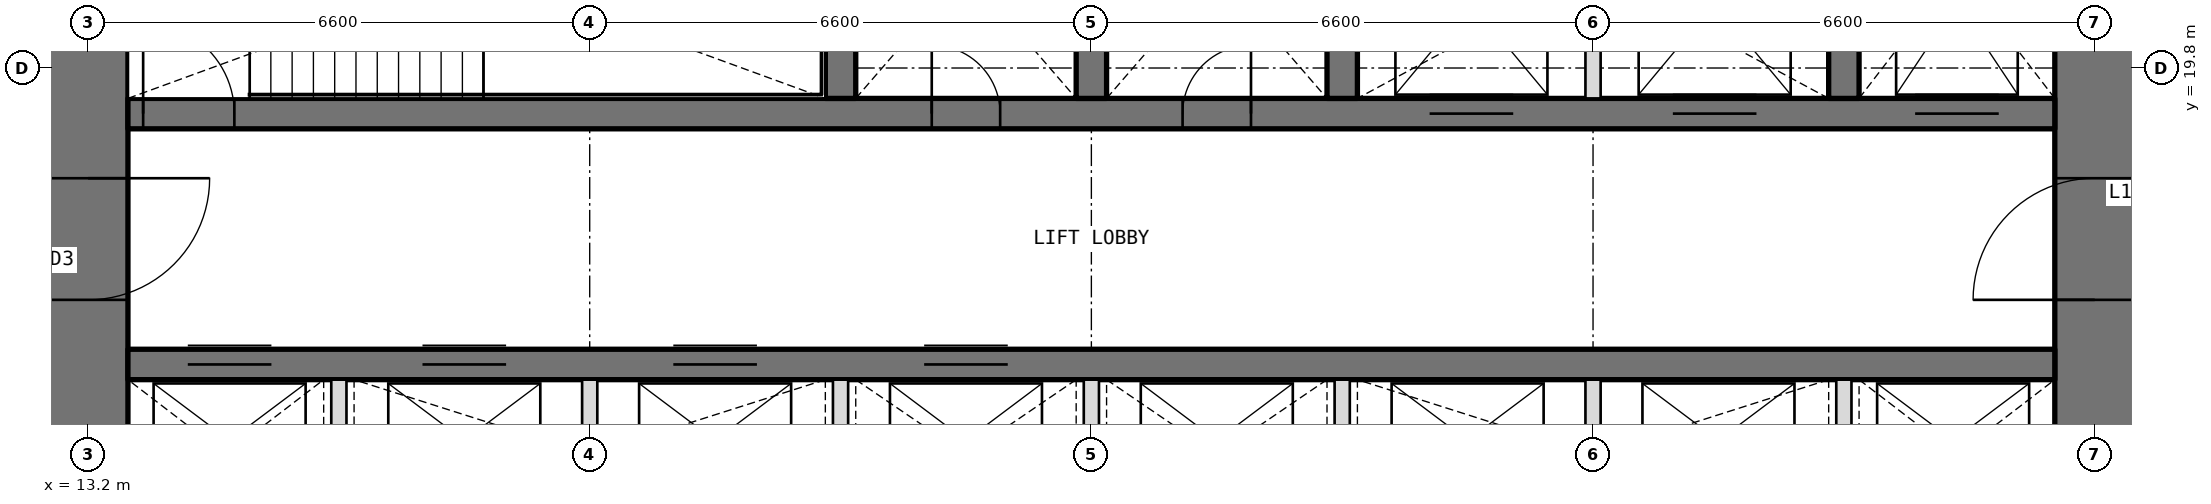
"""IFC4 building model, lengths in metres.
Left out: names, types, materials, properties, quantities, classifications, styles, units other than length and angle.
Written with IfcOpenShell. Run it as: python <this file> out.ifc"""

import sys

from ifc_helpers import new_model, si_unit, direction, frame, frame_2d, origin, place, context, subcontext, project, spatial, rectangle, extrude, element, fill, save


model = new_model("IFC4")
c1 = context("Model", 3, precision=1e-05, world=origin(), true_north=direction((0.0, 1.0)))
c2 = subcontext(c1, "Body", "Model", "MODEL_VIEW")
j1 = project(units=[si_unit("LENGTHUNIT", "METRE"), si_unit("PLANEANGLEUNIT", "RADIAN")], contexts=[c1])
p1 = place(None, origin())
s1 = spatial("IfcSite", under=j1, at=p1, CompositionType="ELEMENT")
p2 = place(p1, origin())
s2 = spatial("IfcBuilding", under=s1, at=p2, CompositionType="ELEMENT")
p3 = place(p2, frame((0.0, 0.0, 50.7)))
s3 = spatial("IfcBuildingStorey", under=s2, at=p3, CompositionType="ELEMENT", Elevation=50.7)
p4 = place(p3, frame((39.6, 13.725, 0.0), z_axis=(0.0, 0.0, 1.0), x_axis=(0.0, 1.0, 0.0)))
e1 = element("IfcWall", 1, at=p4, inside=s3, PredefinedType="SHEAR", context=c2, shape_type="SweptSolid", body=[
    extrude(rectangle(XDim=18.75, YDim=1.05, at=frame_2d((9.375, 0.0))), origin(), (0.0, 0.0, 1.0), 4.2),
])
p5 = place(p4, frame((3.025, 0.0, 0.0)))
e2 = element("IfcOpeningElement", 2, at=p5, cuts=e1, PredefinedType="OPENING", context=c2, shape_type="SweptSolid", body=[
    extrude(rectangle(XDim=1.6, YDim=2.1, at=frame_2d((0.8, 1.05))), frame((0.0, 0.535, 0.0), z_axis=(0.0, -1.0, 0.0), x_axis=(1.0, 0.0, 0.0)), (0.0, 0.0, 1.0), 1.07),
])
p6 = place(p4, frame((13.825, 0.0, 0.0)))
e3 = element("IfcOpeningElement", 3, at=p6, cuts=e1, PredefinedType="OPENING", context=c2, shape_type="SweptSolid", body=[
    extrude(rectangle(XDim=1.6, YDim=2.1, at=frame_2d((0.8, 1.05))), frame((0.0, 0.535, 0.0), z_axis=(0.0, -1.0, 0.0), x_axis=(1.0, 0.0, 0.0)), (0.0, 0.0, 1.0), 1.07),
])
p7 = place(p3, frame((13.2, 32.475, 0.0), z_axis=(0.0, 0.0, 1.0), x_axis=(0.0, -1.0, 0.0)))
e4 = element("IfcWall", 4, at=p7, inside=s3, PredefinedType="SHEAR", context=c2, shape_type="SweptSolid", body=[
    extrude(rectangle(XDim=18.75, YDim=1.05, at=frame_2d((9.375, 0.0))), origin(), (0.0, 0.0, 1.0), 4.2),
])
p8 = place(p7, frame((14.125, 0.0, 0.0)))
e5 = element("IfcOpeningElement", 5, at=p8, cuts=e4, PredefinedType="OPENING", context=c2, shape_type="SweptSolid", body=[
    extrude(rectangle(XDim=1.6, YDim=2.1, at=frame_2d((0.8, 1.05))), frame((0.0, 0.535, 0.0), z_axis=(0.0, -1.0, 0.0), x_axis=(1.0, 0.0, 0.0)), (0.0, 0.0, 1.0), 1.07),
])
p9 = place(p7, frame((3.325, 0.0, 0.0)))
e6 = element("IfcOpeningElement", 6, at=p9, cuts=e4, PredefinedType="OPENING", context=c2, shape_type="SweptSolid", body=[
    extrude(rectangle(XDim=1.6, YDim=2.1, at=frame_2d((0.8, 1.05))), frame((0.0, 0.535, 0.0), z_axis=(0.0, -1.0, 0.0), x_axis=(1.0, 0.0, 0.0)), (0.0, 0.0, 1.0), 1.07),
])
p10 = place(p3, frame((13.725, 15.9, 0.0), z_axis=(0.0, 0.0, 1.0), x_axis=(1.0, 0.0, 0.0)))
e7 = element("IfcWall", 7, at=p10, inside=s3, PredefinedType="SHEAR", context=c2, shape_type="SweptSolid", body=[
    extrude(rectangle(XDim=25.35, YDim=0.4, at=frame_2d((12.675, 0.0))), origin(), (0.0, 0.0, 1.0), 4.2),
])
p11 = place(p10, frame((0.788, 0.0, 0.0)))
e8 = element("IfcOpeningElement", 8, at=p11, cuts=e7, PredefinedType="OPENING", context=c2, shape_type="SweptSolid", body=[
    extrude(rectangle(XDim=1.1, YDim=2.1, at=frame_2d((0.55, 1.05))), frame((0.0, 0.21, 0.0), z_axis=(0.0, -1.0, 0.0), x_axis=(1.0, 0.0, 0.0)), (0.0, 0.0, 1.0), 0.42),
])
p12 = place(p10, frame((3.875, 0.0, 0.0)))
e9 = element("IfcOpeningElement", 9, at=p12, cuts=e7, PredefinedType="OPENING", context=c2, shape_type="SweptSolid", body=[
    extrude(rectangle(XDim=1.1, YDim=2.1, at=frame_2d((0.55, 1.05))), frame((0.0, 0.21, 0.0), z_axis=(0.0, -1.0, 0.0), x_axis=(1.0, 0.0, 0.0)), (0.0, 0.0, 1.0), 0.42),
])
p13 = place(p10, frame((7.175, 0.0, 0.0)))
e10 = element("IfcOpeningElement", 10, at=p13, cuts=e7, PredefinedType="OPENING", context=c2, shape_type="SweptSolid", body=[
    extrude(rectangle(XDim=1.1, YDim=2.1, at=frame_2d((0.55, 1.05))), frame((0.0, 0.21, 0.0), z_axis=(0.0, -1.0, 0.0), x_axis=(1.0, 0.0, 0.0)), (0.0, 0.0, 1.0), 0.42),
])
p14 = place(p10, frame((10.475, 0.0, 0.0)))
e11 = element("IfcOpeningElement", 11, at=p14, cuts=e7, PredefinedType="OPENING", context=c2, shape_type="SweptSolid", body=[
    extrude(rectangle(XDim=1.1, YDim=2.1, at=frame_2d((0.55, 1.05))), frame((0.0, 0.21, 0.0), z_axis=(0.0, -1.0, 0.0), x_axis=(1.0, 0.0, 0.0)), (0.0, 0.0, 1.0), 0.42),
])
p15 = place(p3, frame((13.725, 19.2, 0.0), z_axis=(0.0, 0.0, 1.0), x_axis=(1.0, 0.0, 0.0)))
e12 = element("IfcWall", 12, at=p15, inside=s3, PredefinedType="SHEAR", context=c2, shape_type="SweptSolid", body=[
    extrude(rectangle(XDim=25.35, YDim=0.4, at=frame_2d((12.675, 0.0))), origin(), (0.0, 0.0, 1.0), 4.2),
])
p16 = place(p15, frame((10.575, 0.0, 0.0)))
e13 = element("IfcOpeningElement", 13, at=p16, cuts=e12, PredefinedType="OPENING", context=c2, shape_type="SweptSolid", body=[
    extrude(rectangle(XDim=0.9, YDim=2.1, at=frame_2d((0.45, 1.05))), frame((0.0, 0.21, 0.0), z_axis=(0.0, -1.0, 0.0), x_axis=(1.0, 0.0, 0.0)), (0.0, 0.0, 1.0), 0.42),
])
p17 = place(p15, frame((13.875, 0.0, 0.0)))
e14 = element("IfcOpeningElement", 14, at=p17, cuts=e12, PredefinedType="OPENING", context=c2, shape_type="SweptSolid", body=[
    extrude(rectangle(XDim=0.9, YDim=2.1, at=frame_2d((0.45, 1.05))), frame((0.0, 0.21, 0.0), z_axis=(0.0, -1.0, 0.0), x_axis=(1.0, 0.0, 0.0)), (0.0, 0.0, 1.0), 0.42),
])
p18 = place(p15, frame((0.2, 0.0, 0.0)))
e15 = element("IfcOpeningElement", 15, at=p18, cuts=e12, PredefinedType="OPENING", context=c2, shape_type="SweptSolid", body=[
    extrude(rectangle(XDim=1.2, YDim=2.1, at=frame_2d((0.6, 1.05))), frame((0.0, 0.21, 0.0), z_axis=(0.0, -1.0, 0.0), x_axis=(1.0, 0.0, 0.0)), (0.0, 0.0, 1.0), 0.42),
])
p19 = place(p15, frame((23.512, 0.0, 0.0)))
e16 = element("IfcOpeningElement", 16, at=p19, cuts=e12, PredefinedType="OPENING", context=c2, shape_type="SweptSolid", body=[
    extrude(rectangle(XDim=1.1, YDim=2.1, at=frame_2d((0.55, 1.05))), frame((0.0, 0.21, 0.0), z_axis=(0.0, -1.0, 0.0), x_axis=(1.0, 0.0, 0.0)), (0.0, 0.0, 1.0), 0.42),
])
p20 = place(p15, frame((17.125, 0.0, 0.0)))
e17 = element("IfcOpeningElement", 17, at=p20, cuts=e12, PredefinedType="OPENING", context=c2, shape_type="SweptSolid", body=[
    extrude(rectangle(XDim=1.1, YDim=2.1, at=frame_2d((0.55, 1.05))), frame((0.0, 0.21, 0.0), z_axis=(0.0, -1.0, 0.0), x_axis=(1.0, 0.0, 0.0)), (0.0, 0.0, 1.0), 0.42),
])
p21 = place(p15, frame((20.325, 0.0, 0.0)))
e18 = element("IfcOpeningElement", 18, at=p21, cuts=e12, PredefinedType="OPENING", context=c2, shape_type="SweptSolid", body=[
    extrude(rectangle(XDim=1.1, YDim=2.1, at=frame_2d((0.55, 1.05))), frame((0.0, 0.21, 0.0), z_axis=(0.0, -1.0, 0.0), x_axis=(1.0, 0.0, 0.0)), (0.0, 0.0, 1.0), 0.42),
])
for number, where, z_axis, x_axis in (
    (19, (23.1, 19.4, 0.0), (0.0, 0.0, 1.0), (0.0, 1.0, 0.0)),
    (20, (26.4, 19.4, 0.0), (0.0, 0.0, 1.0), (0.0, 1.0, 0.0)),
    (21, (29.7, 19.4, 0.0), (0.0, 0.0, 1.0), (0.0, 1.0, 0.0)),
    (22, (36.3, 19.4, 0.0), (0.0, 0.0, 1.0), (0.0, 1.0, 0.0)),
):
    element("IfcWall", number, at=place(p3, frame(where, z_axis=z_axis, x_axis=x_axis)), inside=s3, PredefinedType="SHEAR", context=c2, shape_type="SweptSolid", body=[
        extrude(rectangle(XDim=3.35, YDim=0.4, at=frame_2d((1.675, 0.0))), origin(), (0.0, 0.0, 1.0), 4.2),
    ])
for number, where, z_axis, x_axis in (
    (23, (16.5, 13.725, 0.0), (0.0, 0.0, 1.0), (0.0, 1.0, 0.0)),
    (24, (19.8, 13.725, 0.0), (0.0, 0.0, 1.0), (0.0, 1.0, 0.0)),
    (25, (23.1, 13.725, 0.0), (0.0, 0.0, 1.0), (0.0, 1.0, 0.0)),
    (26, (26.4, 13.725, 0.0), (0.0, 0.0, 1.0), (0.0, 1.0, 0.0)),
    (27, (29.7, 13.725, 0.0), (0.0, 0.0, 1.0), (0.0, 1.0, 0.0)),
    (28, (33.0, 13.725, 0.0), (0.0, 0.0, 1.0), (0.0, 1.0, 0.0)),
    (29, (36.3, 13.725, 0.0), (0.0, 0.0, 1.0), (0.0, 1.0, 0.0)),
):
    element("IfcWall", number, at=place(p3, frame(where, z_axis=z_axis, x_axis=x_axis)), inside=s3, PredefinedType="PARTITIONING", context=c2, shape_type="SweptSolid", body=[
        extrude(rectangle(XDim=1.975, YDim=0.2, at=frame_2d((0.987, 0.0))), origin(), (0.0, 0.0, 1.0), 4.2),
    ])
p22 = place(p3, frame((33.0, 19.4, 0.0), z_axis=(0.0, 0.0, 1.0), x_axis=(0.0, 1.0, 0.0)))
e30 = element("IfcWall", 30, at=p22, inside=s3, PredefinedType="PARTITIONING", context=c2, shape_type="SweptSolid", body=[
    extrude(rectangle(XDim=3.35, YDim=0.2, at=frame_2d((1.675, 0.0))), origin(), (0.0, 0.0, 1.0), 4.2),
])
p23 = place(p16, origin())
e31 = element("IfcDoor", 31, at=p23, inside=s3, OperationType="SINGLE_SWING_LEFT", PredefinedType="DOOR", context=c2, shape_type="SweptSolid", body=[
    extrude(rectangle(XDim=0.9, YDim=2.1, at=frame_2d((0.45, 1.05))), frame((0.0, 0.025, 0.0), z_axis=(0.0, -1.0, 0.0), x_axis=(1.0, 0.0, 0.0)), (0.0, 0.0, 1.0), 0.05),
])
fill(e13, e31)
p24 = place(p17, origin())
e32 = element("IfcDoor", 32, at=p24, inside=s3, OperationType="SINGLE_SWING_RIGHT", PredefinedType="DOOR", context=c2, shape_type="SweptSolid", body=[
    extrude(rectangle(XDim=0.9, YDim=2.1, at=frame_2d((0.45, 1.05))), frame((0.0, 0.025, 0.0), z_axis=(0.0, -1.0, 0.0), x_axis=(1.0, 0.0, 0.0)), (0.0, 0.0, 1.0), 0.05),
])
fill(e14, e32)
p25 = place(p18, origin())
e33 = element("IfcDoor", 33, at=p25, inside=s3, OperationType="SINGLE_SWING_LEFT", PredefinedType="DOOR", context=c2, shape_type="SweptSolid", body=[
    extrude(rectangle(XDim=1.2, YDim=2.1, at=frame_2d((0.6, 1.05))), frame((0.0, 0.025, 0.0), z_axis=(0.0, -1.0, 0.0), x_axis=(1.0, 0.0, 0.0)), (0.0, 0.0, 1.0), 0.05),
])
fill(e15, e33)
p26 = place(p8, origin())
e34 = element("IfcDoor", 34, at=p26, inside=s3, OperationType="DOUBLE_DOOR_DOUBLE_SWING", PredefinedType="DOOR", context=c2, shape_type="SweptSolid", body=[
    extrude(rectangle(XDim=1.6, YDim=2.1, at=frame_2d((0.8, 1.05))), frame((0.0, 0.025, 0.0), z_axis=(0.0, -1.0, 0.0), x_axis=(1.0, 0.0, 0.0)), (0.0, 0.0, 1.0), 0.05),
])
fill(e5, e34)
p27 = place(p5, origin())
e35 = element("IfcDoor", 35, at=p27, inside=s3, OperationType="DOUBLE_DOOR_DOUBLE_SWING", PredefinedType="DOOR", context=c2, shape_type="SweptSolid", body=[
    extrude(rectangle(XDim=1.6, YDim=2.1, at=frame_2d((0.8, 1.05))), frame((0.0, 0.025, 0.0), z_axis=(0.0, -1.0, 0.0), x_axis=(1.0, 0.0, 0.0)), (0.0, 0.0, 1.0), 0.05),
])
fill(e2, e35)
p28 = place(p11, origin())
e36 = element("IfcDoor", 36, at=p28, inside=s3, OperationType="DOUBLE_DOOR_SLIDING", PredefinedType="DOOR", context=c2, shape_type="SweptSolid", body=[
    extrude(rectangle(XDim=1.1, YDim=2.1, at=frame_2d((0.55, 1.05))), frame((0.0, 0.025, 0.0), z_axis=(0.0, -1.0, 0.0), x_axis=(1.0, 0.0, 0.0)), (0.0, 0.0, 1.0), 0.05),
])
fill(e8, e36)
p29 = place(p12, origin())
e37 = element("IfcDoor", 37, at=p29, inside=s3, OperationType="DOUBLE_DOOR_SLIDING", PredefinedType="DOOR", context=c2, shape_type="SweptSolid", body=[
    extrude(rectangle(XDim=1.1, YDim=2.1, at=frame_2d((0.55, 1.05))), frame((0.0, 0.025, 0.0), z_axis=(0.0, -1.0, 0.0), x_axis=(1.0, 0.0, 0.0)), (0.0, 0.0, 1.0), 0.05),
])
fill(e9, e37)
p30 = place(p13, origin())
e38 = element("IfcDoor", 38, at=p30, inside=s3, OperationType="DOUBLE_DOOR_SLIDING", PredefinedType="DOOR", context=c2, shape_type="SweptSolid", body=[
    extrude(rectangle(XDim=1.1, YDim=2.1, at=frame_2d((0.55, 1.05))), frame((0.0, 0.025, 0.0), z_axis=(0.0, -1.0, 0.0), x_axis=(1.0, 0.0, 0.0)), (0.0, 0.0, 1.0), 0.05),
])
fill(e10, e38)
p31 = place(p14, origin())
e39 = element("IfcDoor", 39, at=p31, inside=s3, OperationType="DOUBLE_DOOR_SLIDING", PredefinedType="DOOR", context=c2, shape_type="SweptSolid", body=[
    extrude(rectangle(XDim=1.1, YDim=2.1, at=frame_2d((0.55, 1.05))), frame((0.0, 0.025, 0.0), z_axis=(0.0, -1.0, 0.0), x_axis=(1.0, 0.0, 0.0)), (0.0, 0.0, 1.0), 0.05),
])
fill(e11, e39)
p32 = place(p19, origin())
e40 = element("IfcDoor", 40, at=p32, inside=s3, OperationType="DOUBLE_DOOR_SLIDING", PredefinedType="DOOR", context=c2, shape_type="SweptSolid", body=[
    extrude(rectangle(XDim=1.1, YDim=2.1, at=frame_2d((0.55, 1.05))), frame((0.0, 0.025, 0.0), z_axis=(0.0, -1.0, 0.0), x_axis=(1.0, 0.0, 0.0)), (0.0, 0.0, 1.0), 0.05),
])
fill(e16, e40)
p33 = place(p20, origin())
e41 = element("IfcDoor", 41, at=p33, inside=s3, OperationType="DOUBLE_DOOR_SLIDING", PredefinedType="DOOR", context=c2, shape_type="SweptSolid", body=[
    extrude(rectangle(XDim=1.1, YDim=2.1, at=frame_2d((0.55, 1.05))), frame((0.0, 0.025, 0.0), z_axis=(0.0, -1.0, 0.0), x_axis=(1.0, 0.0, 0.0)), (0.0, 0.0, 1.0), 0.05),
])
fill(e17, e41)
p34 = place(p21, origin())
e42 = element("IfcDoor", 42, at=p34, inside=s3, OperationType="DOUBLE_DOOR_SLIDING", PredefinedType="DOOR", context=c2, shape_type="SweptSolid", body=[
    extrude(rectangle(XDim=1.1, YDim=2.1, at=frame_2d((0.55, 1.05))), frame((0.0, 0.025, 0.0), z_axis=(0.0, -1.0, 0.0), x_axis=(1.0, 0.0, 0.0)), (0.0, 0.0, 1.0), 0.05),
])
fill(e18, e42)
save(model, sys.argv[1])
